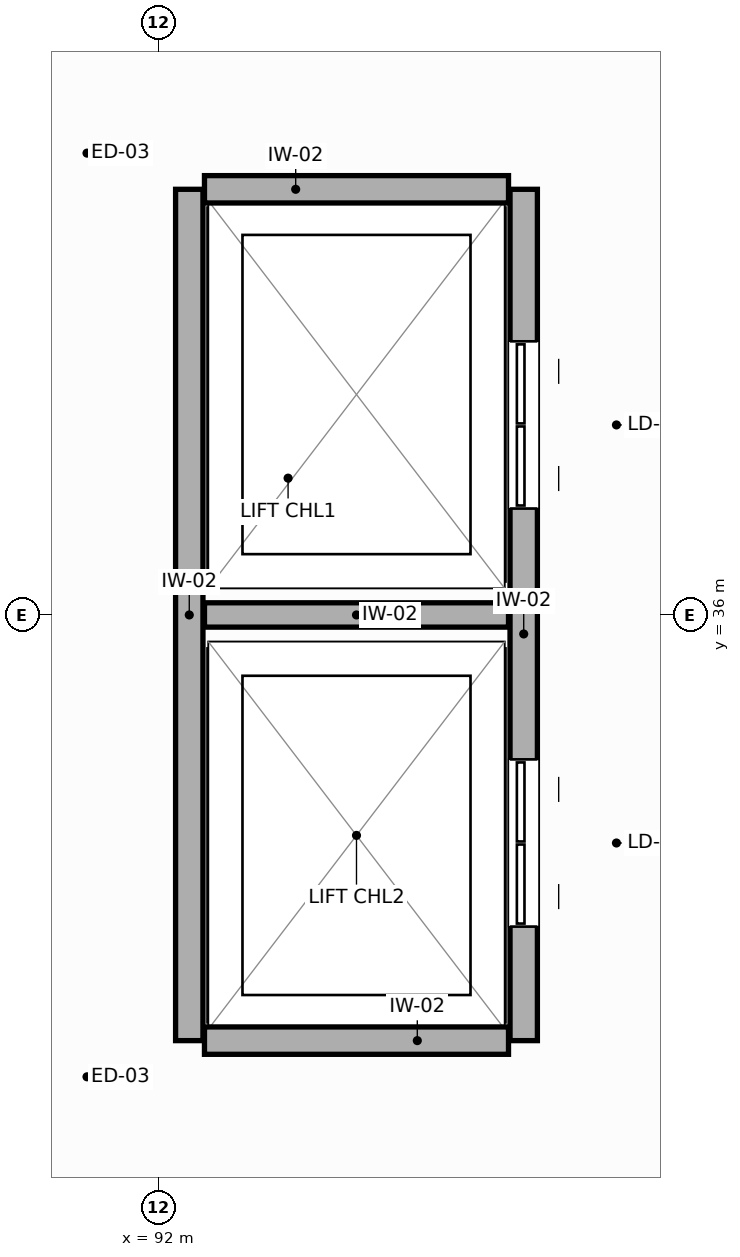
"""IFC4 building model, lengths in metres.
Left out: names, types, materials, properties, quantities, classifications, styles, units other than length and angle.
Written with IfcOpenShell. Run it as: python <this file> out.ifc"""

import sys

from ifc_helpers import new_model, si_unit, direction, frame, frame_2d, origin, place, context, subcontext, project, spatial, rectangle, extrude, element, fill, save


model = new_model("IFC4")
c1 = context("Model", 3, precision=1e-05, world=origin(), true_north=direction((0.0, 1.0)))
c2 = subcontext(c1, "Body", "Model", "MODEL_VIEW")
j1 = project(units=[si_unit("LENGTHUNIT", "METRE"), si_unit("PLANEANGLEUNIT", "RADIAN")], contexts=[c1])
p1 = place(None, origin())
s1 = spatial("IfcSite", under=j1, at=p1, CompositionType="ELEMENT")
p2 = place(p1, origin())
s2 = spatial("IfcBuilding", under=s1, at=p2, CompositionType="ELEMENT")
p3 = place(p2, origin())
s3 = spatial("IfcBuildingStorey", under=s2, at=p3, CompositionType="ELEMENT", Elevation=0.0)
p4 = place(p3, frame((91.421, 41.887, 0.0), z_axis=(0.0, 0.0, 1.0), x_axis=(-0.19504963768, -0.980793372144, 0.0)))
e1 = element("IfcWall", 1, at=p4, inside=s3, PredefinedType="SOLIDWALL", context=c2, shape_type="SweptSolid", body=[
    extrude(rectangle(XDim=5.547, YDim=0.28, at=frame_2d((2.774, 0.0))), origin(), (0.0, 0.0, 1.0), 3.83),
])
p5 = place(p4, frame((1.874, 0.0, 0.0)))
e2 = element("IfcOpeningElement", 2, at=p5, cuts=e1, PredefinedType="OPENING", context=c2, shape_type="SweptSolid", body=[
    extrude(rectangle(XDim=1.8, YDim=2.2, at=frame_2d((0.9, 1.1))), frame((0.0, 0.15, 0.0), z_axis=(0.0, -1.0, 0.0), x_axis=(1.0, 0.0, 0.0)), (0.0, 0.0, 1.0), 0.3),
])
p6 = place(p3, frame((90.339, 35.554, 0.0), z_axis=(0.0, 0.0, 1.0), x_axis=(0.19504963768, -0.980793372144, 0.0)))
e3 = element("IfcWall", 3, at=p6, inside=s3, PredefinedType="SOLIDWALL", context=c2, shape_type="SweptSolid", body=[
    extrude(rectangle(XDim=5.547, YDim=0.28, at=frame_2d((2.774, 0.0))), origin(), (0.0, 0.0, 1.0), 3.83),
])
p7 = place(p6, frame((1.874, 0.0, 0.0)))
e4 = element("IfcOpeningElement", 4, at=p7, cuts=e3, PredefinedType="OPENING", context=c2, shape_type="SweptSolid", body=[
    extrude(rectangle(XDim=1.8, YDim=2.2, at=frame_2d((0.9, 1.1))), frame((0.0, 0.15, 0.0), z_axis=(0.0, -1.0, 0.0), x_axis=(1.0, 0.0, 0.0)), (0.0, 0.0, 1.0), 0.3),
])
p8 = place(p3, frame((94.4, 33.2, 0.0), z_axis=(0.0, 0.0, 1.0), x_axis=(0.0, 1.0, 0.0)))
e5 = element("IfcWall", 5, at=p8, inside=s3, PredefinedType="PARTITIONING", context=c2, shape_type="SweptSolid", body=[
    extrude(rectangle(XDim=5.6, YDim=0.18, at=frame_2d((2.8, 0.0))), origin(), (0.0, 0.0, 1.0), 4.52),
])
p9 = place(p8, frame((3.5, 0.0, 0.0)))
e6 = element("IfcOpeningElement", 6, at=p9, cuts=e5, PredefinedType="OPENING", context=c2, shape_type="SweptSolid", body=[
    extrude(rectangle(XDim=1.1, YDim=2.1, at=frame_2d((0.55, 1.05))), frame((0.0, 0.1, 0.0), z_axis=(0.0, -1.0, 0.0), x_axis=(1.0, 0.0, 0.0)), (0.0, 0.0, 1.0), 0.2),
])
p10 = place(p8, frame((0.75, 0.0, 0.0)))
e7 = element("IfcOpeningElement", 7, at=p10, cuts=e5, PredefinedType="OPENING", context=c2, shape_type="SweptSolid", body=[
    extrude(rectangle(XDim=1.1, YDim=2.1, at=frame_2d((0.55, 1.05))), frame((0.0, 0.1, 0.0), z_axis=(0.0, -1.0, 0.0), x_axis=(1.0, 0.0, 0.0)), (0.0, 0.0, 1.0), 0.2),
])
p11 = place(p3, frame((92.2, 33.2, 0.0), z_axis=(0.0, 0.0, 1.0), x_axis=(0.0, 1.0, 0.0)))
e8 = element("IfcWall", 8, at=p11, inside=s3, PredefinedType="PARTITIONING", context=c2, shape_type="SweptSolid", body=[
    extrude(rectangle(XDim=5.6, YDim=0.18, at=frame_2d((2.8, 0.0))), origin(), (0.0, 0.0, 1.0), 4.52),
])
for number, where, z_axis, x_axis in (
    (9, (92.3, 38.8, 0.0), (0.0, 0.0, 1.0), (1.0, 0.0, 0.0)),
    (10, (92.3, 33.2, 0.0), (0.0, 0.0, 1.0), (1.0, 0.0, 0.0)),
):
    element("IfcWall", number, at=place(p3, frame(where, z_axis=z_axis, x_axis=x_axis)), inside=s3, PredefinedType="PARTITIONING", context=c2, shape_type="SweptSolid", body=[
        extrude(rectangle(XDim=2.0, YDim=0.18, at=frame_2d((1.0, 0.0))), origin(), (0.0, 0.0, 1.0), 4.52),
    ])
p12 = place(p3, frame((92.3, 36.0, 0.0), z_axis=(0.0, 0.0, 1.0), x_axis=(1.0, 0.0, 0.0)))
e11 = element("IfcWall", 11, at=p12, inside=s3, PredefinedType="PARTITIONING", context=c2, shape_type="SweptSolid", body=[
    extrude(rectangle(XDim=2.0, YDim=0.16, at=frame_2d((1.0, 0.0))), origin(), (0.0, 0.0, 1.0), 4.52),
])
p13 = place(p9, origin())
e12 = element("IfcDoor", 12, at=p13, inside=s3, OperationType="DOUBLE_DOOR_SLIDING", PredefinedType="DOOR", context=c2, shape_type="SweptSolid", body=[
    extrude(rectangle(XDim=1.1, YDim=2.1, at=frame_2d((0.55, 1.05))), frame((0.0, 0.025, 0.0), z_axis=(0.0, -1.0, 0.0), x_axis=(1.0, 0.0, 0.0)), (0.0, 0.0, 1.0), 0.05),
])
fill(e6, e12)
p14 = place(p10, origin())
e13 = element("IfcDoor", 13, at=p14, inside=s3, OperationType="DOUBLE_DOOR_SLIDING", PredefinedType="DOOR", context=c2, shape_type="SweptSolid", body=[
    extrude(rectangle(XDim=1.1, YDim=2.1, at=frame_2d((0.55, 1.05))), frame((0.0, 0.025, 0.0), z_axis=(0.0, -1.0, 0.0), x_axis=(1.0, 0.0, 0.0)), (0.0, 0.0, 1.0), 0.05),
])
fill(e7, e13)
save(model, sys.argv[1])
